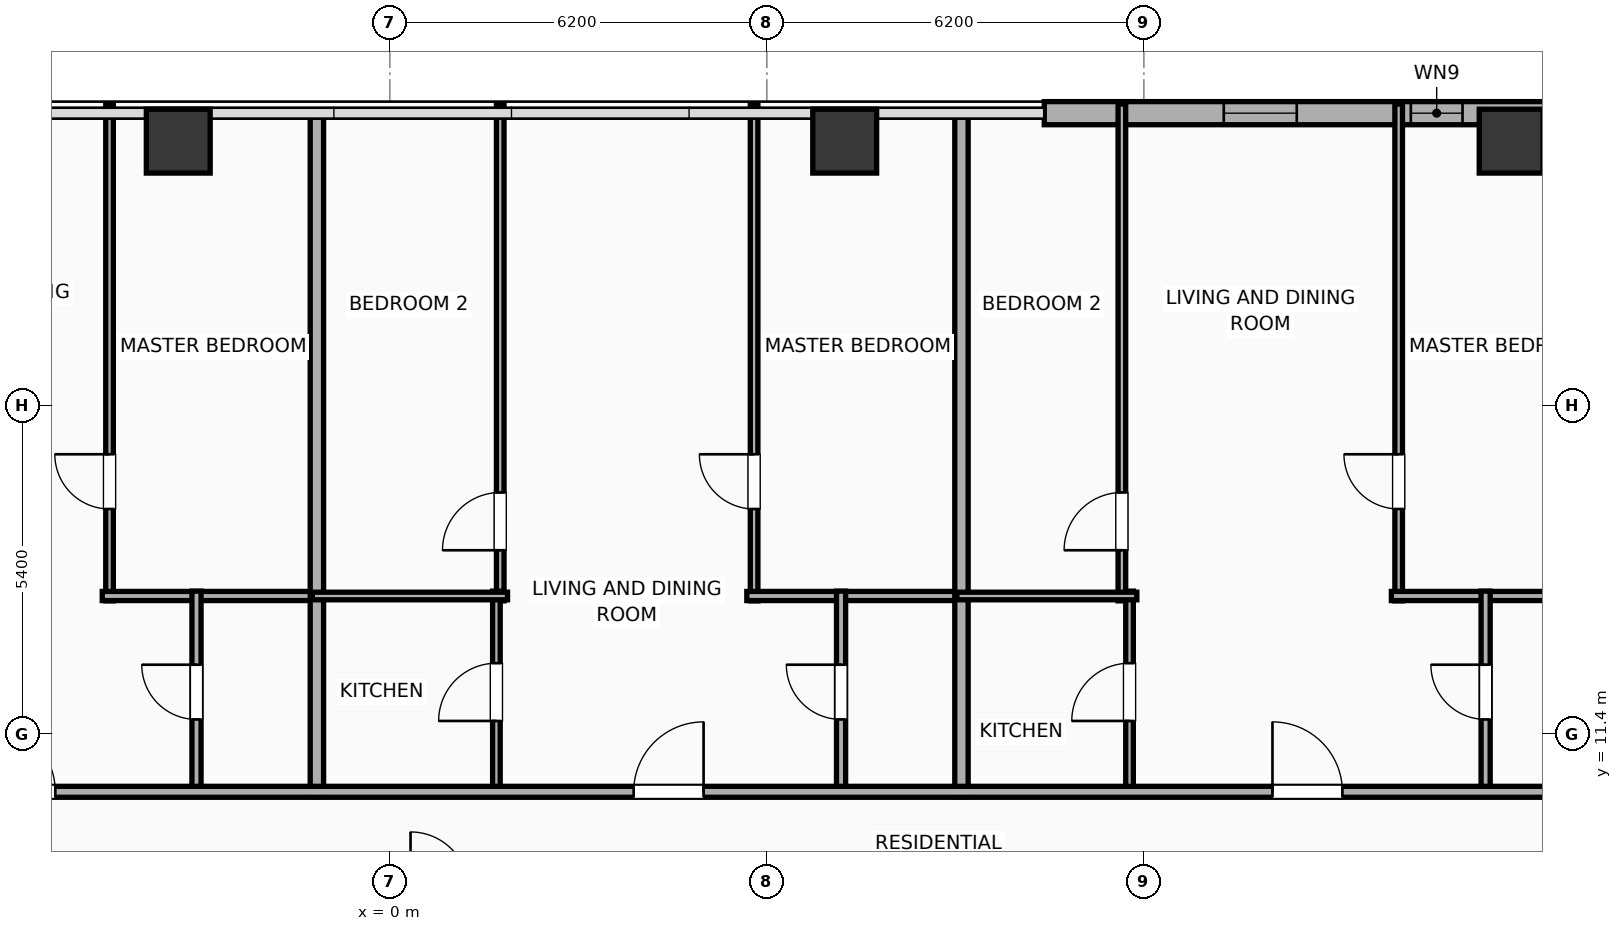
"""IFC4 building model, lengths in metres.
Left out: names, types, materials, properties, quantities, classifications, styles, units other than length and angle.
Written with IfcOpenShell. Run it as: python <this file> out.ifc"""

import sys

from ifc_helpers import new_model, si_unit, direction, frame, frame_2d, origin, origin_2d, place, context, subcontext, project, spatial, rectangle, hollow_rectangle, extrude, element, fill, save


model = new_model("IFC4")
c1 = context("Model", 3, precision=1e-05, world=origin(), true_north=direction((0.0, 1.0)))
c2 = subcontext(c1, "Body", "Model", "MODEL_VIEW")
j1 = project(units=[si_unit("LENGTHUNIT", "METRE"), si_unit("PLANEANGLEUNIT", "RADIAN")], contexts=[c1])
p1 = place(None, origin())
s1 = spatial("IfcSite", under=j1, at=p1, CompositionType="ELEMENT")
p2 = place(p1, origin())
s2 = spatial("IfcBuilding", under=s1, at=p2, CompositionType="ELEMENT")
p3 = place(p2, frame((0.0, 0.0, 117.0)))
s3 = spatial("IfcBuildingStorey", under=s2, at=p3, CompositionType="ELEMENT", Elevation=117.0)
for number, where, z_axis, x_axis in (
    (1, (18.44, 21.15, 0.0), (0.0, 0.0, 1.0), (1.0, 0.0, 0.0)),
    (2, (7.48, 21.15, 0.0), (0.0, 0.0, 1.0), (1.0, 0.0, 0.0)),
    (3, (-3.48, 21.15, 0.0), (0.0, 0.0, 1.0), (1.0, 0.0, 0.0)),
):
    element("IfcColumn", number, at=place(p3, frame(where, z_axis=z_axis, x_axis=x_axis)), inside=s3, PredefinedType="COLUMN", context=c2, shape_type="SweptSolid", body=[
        extrude(hollow_rectangle(XDim=1.05, YDim=1.05, WallThickness=0.036, at=origin_2d()), origin(), (0.0, 0.0, 1.0), 3.9),
    ])
p4 = place(p3, frame((10.762, 21.61, 0.0), z_axis=(0.0, 0.0, 1.0), x_axis=(1.0, 0.0, 0.0)))
e4 = element("IfcWall", 4, at=p4, inside=s3, PredefinedType="ELEMENTEDWALL", context=c2, shape_type="SweptSolid", body=[
    extrude(rectangle(XDim=18.619, YDim=0.38, at=frame_2d((9.31, 0.0))), origin(), (0.0, 0.0, 1.0), 3.65),
])
p5 = place(p4, frame((9.76, 0.0, 0.75)))
e5 = element("IfcOpeningElement", 5, at=p5, cuts=e4, PredefinedType="OPENING", context=c2, shape_type="SweptSolid", body=[
    extrude(rectangle(XDim=2.4, YDim=2.1, at=frame_2d((1.2, 1.05))), frame((0.0, 0.2, 0.0), z_axis=(0.0, -1.0, 0.0), x_axis=(1.0, 0.0, 0.0)), (0.0, 0.0, 1.0), 0.4),
])
p6 = place(p4, frame((2.952, 0.0, 0.75)))
e6 = element("IfcOpeningElement", 6, at=p6, cuts=e4, PredefinedType="OPENING", context=c2, shape_type="SweptSolid", body=[
    extrude(rectangle(XDim=1.2, YDim=2.05, at=frame_2d((0.6, 1.025))), frame((0.0, 0.2, 0.0), z_axis=(0.0, -1.0, 0.0), x_axis=(1.0, 0.0, 0.0)), (0.0, 0.0, 1.0), 0.4),
])
p7 = place(p4, frame((6.028, 0.0, 0.75)))
e7 = element("IfcOpeningElement", 7, at=p7, cuts=e4, PredefinedType="OPENING", context=c2, shape_type="SweptSolid", body=[
    extrude(rectangle(XDim=0.85, YDim=2.05, at=frame_2d((0.425, 1.025))), frame((0.0, 0.2, 0.0), z_axis=(0.0, -1.0, 0.0), x_axis=(1.0, 0.0, 0.0)), (0.0, 0.0, 1.0), 0.4),
])
p8 = place(p4, frame((13.542, 0.0, 0.75)))
e8 = element("IfcOpeningElement", 8, at=p8, cuts=e4, PredefinedType="OPENING", context=c2, shape_type="SweptSolid", body=[
    extrude(rectangle(XDim=1.2, YDim=2.05, at=frame_2d((0.6, 1.025))), frame((0.0, 0.2, 0.0), z_axis=(0.0, -1.0, 0.0), x_axis=(1.0, 0.0, 0.0)), (0.0, 0.0, 1.0), 0.4),
])
p9 = place(p4, frame((16.188, 0.0, 0.75)))
e9 = element("IfcOpeningElement", 9, at=p9, cuts=e4, PredefinedType="OPENING", context=c2, shape_type="SweptSolid", body=[
    extrude(rectangle(XDim=1.2, YDim=2.05, at=frame_2d((0.6, 1.025))), frame((0.0, 0.2, 0.0), z_axis=(0.0, -1.0, 0.0), x_axis=(1.0, 0.0, 0.0)), (0.0, 0.0, 1.0), 0.4),
])
p10 = place(p3, frame((-4.61, 13.59, 0.0), z_axis=(0.0, 0.0, 1.0), x_axis=(0.0, 1.0, 0.0)))
e10 = element("IfcWall", 10, at=p10, inside=s3, PredefinedType="PARTITIONING", context=c2, shape_type="SweptSolid", body=[
    extrude(rectangle(XDim=8.17, YDim=0.125, at=frame_2d((4.085, 0.0))), origin(), (0.0, 0.0, 1.0), 3.65),
])
p11 = place(p10, frame((1.511, 0.0, 0.0)))
e11 = element("IfcOpeningElement", 11, at=p11, cuts=e10, PredefinedType="OPENING", context=c2, shape_type="SweptSolid", body=[
    extrude(rectangle(XDim=0.9, YDim=2.05, at=frame_2d((0.45, 1.025))), frame((0.0, 0.073, 0.0), z_axis=(0.0, -1.0, 0.0), x_axis=(1.0, 0.0, 0.0)), (0.0, 0.0, 1.0), 0.145),
])
p12 = place(p3, frame((-4.73, 13.67, 0.0), z_axis=(0.0, 0.0, 1.0), x_axis=(1.0, 0.0, 0.0)))
e12 = element("IfcWall", 12, at=p12, inside=s3, PredefinedType="PLUMBINGWALL", context=c2, shape_type="SweptSolid", body=[
    extrude(rectangle(XDim=3.605, YDim=0.15, at=frame_2d((1.802, 0.0))), origin(), (0.0, 0.0, 1.0), 3.65),
])
p13 = place(p3, frame((-3.18, 10.43, 0.0), z_axis=(0.0, 0.0, 1.0), x_axis=(0.0, 1.0, 0.0)))
e13 = element("IfcWall", 13, at=p13, inside=s3, PredefinedType="PLUMBINGWALL", context=c2, shape_type="SweptSolid", body=[
    extrude(rectangle(XDim=3.32, YDim=0.15, at=frame_2d((1.66, 0.0))), origin(), (0.0, 0.0, 1.0), 3.65),
])
p14 = place(p13, frame((1.21, 0.0, 0.0)))
e14 = element("IfcOpeningElement", 14, at=p14, cuts=e13, PredefinedType="OPENING", context=c2, shape_type="SweptSolid", body=[
    extrude(rectangle(XDim=0.9, YDim=2.05, at=frame_2d((0.45, 1.025))), frame((0.0, 0.085, 0.0), z_axis=(0.0, -1.0, 0.0), x_axis=(1.0, 0.0, 0.0)), (0.0, 0.0, 1.0), 0.17),
])
p15 = place(p3, frame((-1.2, 10.37, 0.0), z_axis=(0.0, 0.0, 1.0), x_axis=(0.0, 1.0, 0.0)))
e15 = element("IfcWall", 15, at=p15, inside=s3, PredefinedType="PARTITIONING", context=c2, shape_type="SweptSolid", body=[
    extrude(rectangle(XDim=11.24, YDim=0.22, at=frame_2d((5.62, 0.0))), origin(), (0.0, 0.0, 1.0), 3.65),
])
p16 = place(p3, frame((1.815, 13.59, 0.0), z_axis=(0.0, 0.0, 1.0), x_axis=(0.0, 1.0, 0.0)))
e16 = element("IfcWall", 16, at=p16, inside=s3, PredefinedType="PARTITIONING", context=c2, shape_type="SweptSolid", body=[
    extrude(rectangle(XDim=8.17, YDim=0.125, at=frame_2d((4.085, 0.0))), origin(), (0.0, 0.0, 1.0), 3.65),
])
p17 = place(p16, frame((0.832, 0.0, 0.0)))
e17 = element("IfcOpeningElement", 17, at=p17, cuts=e16, PredefinedType="OPENING", context=c2, shape_type="SweptSolid", body=[
    extrude(rectangle(XDim=0.95, YDim=2.05, at=frame_2d((0.475, 1.025))), frame((0.0, 0.073, 0.0), z_axis=(0.0, -1.0, 0.0), x_axis=(1.0, 0.0, 0.0)), (0.0, 0.0, 1.0), 0.145),
])
p18 = place(p3, frame((5.99, 13.59, 0.0), z_axis=(0.0, 0.0, 1.0), x_axis=(0.0, 1.0, 0.0)))
e18 = element("IfcWall", 18, at=p18, inside=s3, PredefinedType="PARTITIONING", context=c2, shape_type="SweptSolid", body=[
    extrude(rectangle(XDim=8.17, YDim=0.125, at=frame_2d((4.085, 0.0))), origin(), (0.0, 0.0, 1.0), 3.04),
])
p19 = place(p18, frame((1.511, 0.0, 0.0)))
e19 = element("IfcOpeningElement", 19, at=p19, cuts=e18, PredefinedType="OPENING", context=c2, shape_type="SweptSolid", body=[
    extrude(rectangle(XDim=0.9, YDim=2.05, at=frame_2d((0.45, 1.025))), frame((0.0, 0.073, 0.0), z_axis=(0.0, -1.0, 0.0), x_axis=(1.0, 0.0, 0.0)), (0.0, 0.0, 1.0), 0.145),
])
p20 = place(p3, frame((5.87, 13.67, 0.0), z_axis=(0.0, 0.0, 1.0), x_axis=(1.0, 0.0, 0.0)))
e20 = element("IfcWall", 20, at=p20, inside=s3, PredefinedType="PLUMBINGWALL", context=c2, shape_type="SweptSolid", body=[
    extrude(rectangle(XDim=3.605, YDim=0.15, at=frame_2d((1.802, 0.0))), origin(), (0.0, 0.0, 1.0), 3.65),
])
p21 = place(p3, frame((1.752, 10.43, 0.0), z_axis=(0.0, 0.0, 1.0), x_axis=(0.0, 1.0, 0.0)))
e21 = element("IfcWall", 21, at=p21, inside=s3, PredefinedType="PARTITIONING", context=c2, shape_type="SweptSolid", body=[
    extrude(rectangle(XDim=3.32, YDim=0.125, at=frame_2d((1.66, 0.0))), origin(), (0.0, 0.0, 1.0), 3.65),
])
p22 = place(p21, frame((1.185, 0.0, 0.0)))
e22 = element("IfcOpeningElement", 22, at=p22, cuts=e21, PredefinedType="OPENING", context=c2, shape_type="SweptSolid", body=[
    extrude(rectangle(XDim=0.95, YDim=2.05, at=frame_2d((0.475, 1.025))), frame((0.0, 0.073, 0.0), z_axis=(0.0, -1.0, 0.0), x_axis=(1.0, 0.0, 0.0)), (0.0, 0.0, 1.0), 0.145),
])
p23 = place(p3, frame((-1.275, 13.67, 0.0), z_axis=(0.0, 0.0, 1.0), x_axis=(1.0, 0.0, 0.0)))
e23 = element("IfcWall", 23, at=p23, inside=s3, PredefinedType="PARTITIONING", context=c2, shape_type="SweptSolid", body=[
    extrude(rectangle(XDim=3.21, YDim=0.125, at=frame_2d((1.605, 0.0))), origin(), (0.0, 0.0, 1.0), 3.65),
])
p24 = place(p3, frame((7.42, 10.43, 0.0), z_axis=(0.0, 0.0, 1.0), x_axis=(0.0, 1.0, 0.0)))
e24 = element("IfcWall", 24, at=p24, inside=s3, PredefinedType="PLUMBINGWALL", context=c2, shape_type="SweptSolid", body=[
    extrude(rectangle(XDim=3.32, YDim=0.15, at=frame_2d((1.66, 0.0))), origin(), (0.0, 0.0, 1.0), 3.65),
])
p25 = place(p24, frame((1.21, 0.0, 0.0)))
e25 = element("IfcOpeningElement", 25, at=p25, cuts=e24, PredefinedType="OPENING", context=c2, shape_type="SweptSolid", body=[
    extrude(rectangle(XDim=0.9, YDim=2.05, at=frame_2d((0.45, 1.025))), frame((0.0, 0.085, 0.0), z_axis=(0.0, -1.0, 0.0), x_axis=(1.0, 0.0, 0.0)), (0.0, 0.0, 1.0), 0.17),
])
p26 = place(p3, frame((9.4, 10.37, 0.0), z_axis=(0.0, 0.0, 1.0), x_axis=(0.0, 1.0, 0.0)))
e26 = element("IfcWall", 26, at=p26, inside=s3, PredefinedType="PARTITIONING", context=c2, shape_type="SweptSolid", body=[
    extrude(rectangle(XDim=11.24, YDim=0.22, at=frame_2d((5.62, 0.0))), origin(), (0.0, 0.0, 1.0), 3.65),
])
p27 = place(p3, frame((12.038, 13.59, 0.0), z_axis=(0.0, 0.0, 1.0), x_axis=(0.0, 1.0, 0.0)))
e27 = element("IfcWall", 27, at=p27, inside=s3, PredefinedType="PARTITIONING", context=c2, shape_type="SweptSolid", body=[
    extrude(rectangle(XDim=8.17, YDim=0.125, at=frame_2d((4.085, 0.0))), origin(), (0.0, 0.0, 1.0), 3.65),
])
p28 = place(p27, frame((0.832, 0.0, 0.0)))
e28 = element("IfcOpeningElement", 28, at=p28, cuts=e27, PredefinedType="OPENING", context=c2, shape_type="SweptSolid", body=[
    extrude(rectangle(XDim=0.95, YDim=2.05, at=frame_2d((0.475, 1.025))), frame((0.0, 0.073, 0.0), z_axis=(0.0, -1.0, 0.0), x_axis=(1.0, 0.0, 0.0)), (0.0, 0.0, 1.0), 0.145),
])
p29 = place(p3, frame((16.59, 13.59, 0.0), z_axis=(0.0, 0.0, 1.0), x_axis=(0.0, 1.0, 0.0)))
e29 = element("IfcWall", 29, at=p29, inside=s3, PredefinedType="PARTITIONING", context=c2, shape_type="SweptSolid", body=[
    extrude(rectangle(XDim=8.17, YDim=0.125, at=frame_2d((4.085, 0.0))), origin(), (0.0, 0.0, 1.0), 3.65),
])
p30 = place(p29, frame((1.511, 0.0, 0.0)))
e30 = element("IfcOpeningElement", 30, at=p30, cuts=e29, PredefinedType="OPENING", context=c2, shape_type="SweptSolid", body=[
    extrude(rectangle(XDim=0.9, YDim=2.05, at=frame_2d((0.45, 1.025))), frame((0.0, 0.073, 0.0), z_axis=(0.0, -1.0, 0.0), x_axis=(1.0, 0.0, 0.0)), (0.0, 0.0, 1.0), 0.145),
])
p31 = place(p3, frame((16.47, 13.67, 0.0), z_axis=(0.0, 0.0, 1.0), x_axis=(1.0, 0.0, 0.0)))
e31 = element("IfcWall", 31, at=p31, inside=s3, PredefinedType="PLUMBINGWALL", context=c2, shape_type="SweptSolid", body=[
    extrude(rectangle(XDim=3.605, YDim=0.15, at=frame_2d((1.802, 0.0))), origin(), (0.0, 0.0, 1.0), 3.65),
])
p32 = place(p3, frame((12.164, 10.43, 0.0), z_axis=(0.0, 0.0, 1.0), x_axis=(0.0, 1.0, 0.0)))
e32 = element("IfcWall", 32, at=p32, inside=s3, PredefinedType="PARTITIONING", context=c2, shape_type="SweptSolid", body=[
    extrude(rectangle(XDim=3.32, YDim=0.125, at=frame_2d((1.66, 0.0))), origin(), (0.0, 0.0, 1.0), 3.65),
])
p33 = place(p32, frame((1.185, 0.0, 0.0)))
e33 = element("IfcOpeningElement", 33, at=p33, cuts=e32, PredefinedType="OPENING", context=c2, shape_type="SweptSolid", body=[
    extrude(rectangle(XDim=0.95, YDim=2.05, at=frame_2d((0.475, 1.025))), frame((0.0, 0.073, 0.0), z_axis=(0.0, -1.0, 0.0), x_axis=(1.0, 0.0, 0.0)), (0.0, 0.0, 1.0), 0.145),
])
p34 = place(p3, frame((9.325, 13.67, 0.0), z_axis=(0.0, 0.0, 1.0), x_axis=(1.0, 0.0, 0.0)))
e34 = element("IfcWall", 34, at=p34, inside=s3, PredefinedType="PARTITIONING", context=c2, shape_type="SweptSolid", body=[
    extrude(rectangle(XDim=2.959, YDim=0.125, at=frame_2d((1.479, 0.0))), origin(), (0.0, 0.0, 1.0), 3.65),
])
p35 = place(p3, frame((18.02, 10.43, 0.0), z_axis=(0.0, 0.0, 1.0), x_axis=(0.0, 1.0, 0.0)))
e35 = element("IfcWall", 35, at=p35, inside=s3, PredefinedType="PLUMBINGWALL", context=c2, shape_type="SweptSolid", body=[
    extrude(rectangle(XDim=3.32, YDim=0.15, at=frame_2d((1.66, 0.0))), origin(), (0.0, 0.0, 1.0), 3.65),
])
p36 = place(p35, frame((1.21, 0.0, 0.0)))
e36 = element("IfcOpeningElement", 36, at=p36, cuts=e35, PredefinedType="OPENING", context=c2, shape_type="SweptSolid", body=[
    extrude(rectangle(XDim=0.9, YDim=2.05, at=frame_2d((0.45, 1.025))), frame((0.0, 0.085, 0.0), z_axis=(0.0, -1.0, 0.0), x_axis=(1.0, 0.0, 0.0)), (0.0, 0.0, 1.0), 0.17),
])
p37 = place(p3, frame((-29.21, 10.45, 0.0), z_axis=(0.0, 0.0, 1.0), x_axis=(1.0, 0.0, 0.0)))
e37 = element("IfcWall", 37, at=p37, inside=s3, PredefinedType="PARTITIONING", context=c2, shape_type="SweptSolid", body=[
    extrude(rectangle(XDim=62.42, YDim=0.18, at=frame_2d((31.21, 0.0))), origin(), (0.0, 0.0, 1.0), 3.65),
])
p38 = place(p37, frame((3.083, 0.0, 0.0)))
e38 = element("IfcOpeningElement", 38, at=p38, cuts=e37, PredefinedType="OPENING", context=c2, shape_type="SweptSolid", body=[
    extrude(rectangle(XDim=0.9, YDim=2.05, at=frame_2d((0.45, 1.025))), frame((0.0, 0.1, 0.0), z_axis=(0.0, -1.0, 0.0), x_axis=(1.0, 0.0, 0.0)), (0.0, 0.0, 1.0), 0.2),
])
p39 = place(p37, frame((12.052, 0.0, 0.0)))
e39 = element("IfcOpeningElement", 39, at=p39, cuts=e37, PredefinedType="OPENING", context=c2, shape_type="SweptSolid", body=[
    extrude(rectangle(XDim=1.15, YDim=2.05, at=frame_2d((0.575, 1.025))), frame((0.0, 0.1, 0.0), z_axis=(0.0, -1.0, 0.0), x_axis=(1.0, 0.0, 0.0)), (0.0, 0.0, 1.0), 0.2),
])
p40 = place(p37, frame((22.558, 0.0, 0.0)))
e40 = element("IfcOpeningElement", 40, at=p40, cuts=e37, PredefinedType="OPENING", context=c2, shape_type="SweptSolid", body=[
    extrude(rectangle(XDim=1.15, YDim=2.05, at=frame_2d((0.575, 1.025))), frame((0.0, 0.1, 0.0), z_axis=(0.0, -1.0, 0.0), x_axis=(1.0, 0.0, 0.0)), (0.0, 0.0, 1.0), 0.2),
])
p41 = place(p37, frame((33.219, 0.0, 0.0)))
e41 = element("IfcOpeningElement", 41, at=p41, cuts=e37, PredefinedType="OPENING", context=c2, shape_type="SweptSolid", body=[
    extrude(rectangle(XDim=1.15, YDim=2.05, at=frame_2d((0.575, 1.025))), frame((0.0, 0.1, 0.0), z_axis=(0.0, -1.0, 0.0), x_axis=(1.0, 0.0, 0.0)), (0.0, 0.0, 1.0), 0.2),
])
p42 = place(p37, frame((43.725, 0.0, 0.0)))
e42 = element("IfcOpeningElement", 42, at=p42, cuts=e37, PredefinedType="OPENING", context=c2, shape_type="SweptSolid", body=[
    extrude(rectangle(XDim=1.15, YDim=2.05, at=frame_2d((0.575, 1.025))), frame((0.0, 0.1, 0.0), z_axis=(0.0, -1.0, 0.0), x_axis=(1.0, 0.0, 0.0)), (0.0, 0.0, 1.0), 0.2),
])
p43 = place(p37, frame((52.232, 0.0, 0.0)))
e43 = element("IfcOpeningElement", 43, at=p43, cuts=e37, PredefinedType="OPENING", context=c2, shape_type="SweptSolid", body=[
    extrude(rectangle(XDim=0.9, YDim=2.05, at=frame_2d((0.45, 1.025))), frame((0.0, 0.1, 0.0), z_axis=(0.0, -1.0, 0.0), x_axis=(1.0, 0.0, 0.0)), (0.0, 0.0, 1.0), 0.2),
])
p44 = place(p37, frame((58.868, 0.0, 0.0)))
e44 = element("IfcOpeningElement", 44, at=p44, cuts=e37, PredefinedType="OPENING", context=c2, shape_type="SweptSolid", body=[
    extrude(rectangle(XDim=0.9, YDim=2.05, at=frame_2d((0.45, 1.025))), frame((0.0, 0.1, 0.0), z_axis=(0.0, -1.0, 0.0), x_axis=(1.0, 0.0, 0.0)), (0.0, 0.0, 1.0), 0.2),
])
p45 = place(p6, origin())
e45 = element("IfcWindow", 45, at=p45, inside=s3, PartitioningType="SINGLE_PANEL", PredefinedType="WINDOW", context=c2, shape_type="SweptSolid", body=[
    extrude(rectangle(XDim=1.2, YDim=2.05, at=frame_2d((0.6, 1.025))), frame((0.0, 0.03, 0.0), z_axis=(0.0, -1.0, 0.0), x_axis=(1.0, 0.0, 0.0)), (0.0, 0.0, 1.0), 0.06),
])
fill(e6, e45)
p46 = place(p7, origin())
e46 = element("IfcWindow", 46, at=p46, inside=s3, PartitioningType="SINGLE_PANEL", PredefinedType="WINDOW", context=c2, shape_type="SweptSolid", body=[
    extrude(rectangle(XDim=0.85, YDim=2.05, at=frame_2d((0.425, 1.025))), frame((0.0, 0.03, 0.0), z_axis=(0.0, -1.0, 0.0), x_axis=(1.0, 0.0, 0.0)), (0.0, 0.0, 1.0), 0.06),
])
fill(e7, e46)
p47 = place(p11, origin())
e47 = element("IfcDoor", 47, at=p47, inside=s3, OperationType="SINGLE_SWING_RIGHT", PredefinedType="DOOR", context=c2, shape_type="SweptSolid", body=[
    extrude(rectangle(XDim=0.9, YDim=2.05, at=frame_2d((0.45, 1.025))), frame((0.0, 0.025, 0.0), z_axis=(0.0, -1.0, 0.0), x_axis=(1.0, 0.0, 0.0)), (0.0, 0.0, 1.0), 0.05),
])
fill(e11, e47)
p48 = place(p14, origin())
e48 = element("IfcDoor", 48, at=p48, inside=s3, OperationType="SINGLE_SWING_RIGHT", PredefinedType="DOOR", context=c2, shape_type="SweptSolid", body=[
    extrude(rectangle(XDim=0.9, YDim=2.05, at=frame_2d((0.45, 1.025))), frame((0.0, 0.025, 0.0), z_axis=(0.0, -1.0, 0.0), x_axis=(1.0, 0.0, 0.0)), (0.0, 0.0, 1.0), 0.05),
])
fill(e14, e48)
p49 = place(p17, origin())
e49 = element("IfcDoor", 49, at=p49, inside=s3, OperationType="SINGLE_SWING_LEFT", PredefinedType="DOOR", context=c2, shape_type="SweptSolid", body=[
    extrude(rectangle(XDim=0.95, YDim=2.05, at=frame_2d((0.475, 1.025))), frame((0.0, 0.025, 0.0), z_axis=(0.0, -1.0, 0.0), x_axis=(1.0, 0.0, 0.0)), (0.0, 0.0, 1.0), 0.05),
])
fill(e17, e49)
p50 = place(p19, origin())
e50 = element("IfcDoor", 50, at=p50, inside=s3, OperationType="SINGLE_SWING_RIGHT", PredefinedType="DOOR", context=c2, shape_type="SweptSolid", body=[
    extrude(rectangle(XDim=0.9, YDim=2.05, at=frame_2d((0.45, 1.025))), frame((0.0, 0.025, 0.0), z_axis=(0.0, -1.0, 0.0), x_axis=(1.0, 0.0, 0.0)), (0.0, 0.0, 1.0), 0.05),
])
fill(e19, e50)
p51 = place(p22, origin())
e51 = element("IfcDoor", 51, at=p51, inside=s3, OperationType="SINGLE_SWING_LEFT", PredefinedType="DOOR", context=c2, shape_type="SweptSolid", body=[
    extrude(rectangle(XDim=0.95, YDim=2.05, at=frame_2d((0.475, 1.025))), frame((0.0, 0.025, 0.0), z_axis=(0.0, -1.0, 0.0), x_axis=(1.0, 0.0, 0.0)), (0.0, 0.0, 1.0), 0.05),
])
fill(e22, e51)
p52 = place(p25, origin())
e52 = element("IfcDoor", 52, at=p52, inside=s3, OperationType="SINGLE_SWING_RIGHT", PredefinedType="DOOR", context=c2, shape_type="SweptSolid", body=[
    extrude(rectangle(XDim=0.9, YDim=2.05, at=frame_2d((0.45, 1.025))), frame((0.0, 0.025, 0.0), z_axis=(0.0, -1.0, 0.0), x_axis=(1.0, 0.0, 0.0)), (0.0, 0.0, 1.0), 0.05),
])
fill(e25, e52)
p53 = place(p28, origin())
e53 = element("IfcDoor", 53, at=p53, inside=s3, OperationType="SINGLE_SWING_LEFT", PredefinedType="DOOR", context=c2, shape_type="SweptSolid", body=[
    extrude(rectangle(XDim=0.95, YDim=2.05, at=frame_2d((0.475, 1.025))), frame((0.0, 0.025, 0.0), z_axis=(0.0, -1.0, 0.0), x_axis=(1.0, 0.0, 0.0)), (0.0, 0.0, 1.0), 0.05),
])
fill(e28, e53)
p54 = place(p30, origin())
e54 = element("IfcDoor", 54, at=p54, inside=s3, OperationType="SINGLE_SWING_RIGHT", PredefinedType="DOOR", context=c2, shape_type="SweptSolid", body=[
    extrude(rectangle(XDim=0.9, YDim=2.05, at=frame_2d((0.45, 1.025))), frame((0.0, 0.025, 0.0), z_axis=(0.0, -1.0, 0.0), x_axis=(1.0, 0.0, 0.0)), (0.0, 0.0, 1.0), 0.05),
])
fill(e30, e54)
p55 = place(p33, origin())
e55 = element("IfcDoor", 55, at=p55, inside=s3, OperationType="SINGLE_SWING_LEFT", PredefinedType="DOOR", context=c2, shape_type="SweptSolid", body=[
    extrude(rectangle(XDim=0.95, YDim=2.05, at=frame_2d((0.475, 1.025))), frame((0.0, 0.025, 0.0), z_axis=(0.0, -1.0, 0.0), x_axis=(1.0, 0.0, 0.0)), (0.0, 0.0, 1.0), 0.05),
])
fill(e33, e55)
p56 = place(p36, origin())
e56 = element("IfcDoor", 56, at=p56, inside=s3, OperationType="SINGLE_SWING_RIGHT", PredefinedType="DOOR", context=c2, shape_type="SweptSolid", body=[
    extrude(rectangle(XDim=0.9, YDim=2.05, at=frame_2d((0.45, 1.025))), frame((0.0, 0.025, 0.0), z_axis=(0.0, -1.0, 0.0), x_axis=(1.0, 0.0, 0.0)), (0.0, 0.0, 1.0), 0.05),
])
fill(e36, e56)
p57 = place(p40, origin())
e57 = element("IfcDoor", 57, at=p57, inside=s3, OperationType="SINGLE_SWING_LEFT", PredefinedType="DOOR", context=c2, shape_type="SweptSolid", body=[
    extrude(rectangle(XDim=1.15, YDim=2.05, at=frame_2d((0.575, 1.025))), frame((0.0, 0.025, 0.0), z_axis=(0.0, -1.0, 0.0), x_axis=(1.0, 0.0, 0.0)), (0.0, 0.0, 1.0), 0.05),
])
fill(e40, e57)
p58 = place(p41, origin())
e58 = element("IfcDoor", 58, at=p58, inside=s3, OperationType="SINGLE_SWING_RIGHT", PredefinedType="DOOR", context=c2, shape_type="SweptSolid", body=[
    extrude(rectangle(XDim=1.15, YDim=2.05, at=frame_2d((0.575, 1.025))), frame((0.0, 0.025, 0.0), z_axis=(0.0, -1.0, 0.0), x_axis=(1.0, 0.0, 0.0)), (0.0, 0.0, 1.0), 0.05),
])
fill(e41, e58)
p59 = place(p42, origin())
e59 = element("IfcDoor", 59, at=p59, inside=s3, OperationType="SINGLE_SWING_LEFT", PredefinedType="DOOR", context=c2, shape_type="SweptSolid", body=[
    extrude(rectangle(XDim=1.15, YDim=2.05, at=frame_2d((0.575, 1.025))), frame((0.0, 0.025, 0.0), z_axis=(0.0, -1.0, 0.0), x_axis=(1.0, 0.0, 0.0)), (0.0, 0.0, 1.0), 0.05),
])
fill(e42, e59)
save(model, sys.argv[1])
